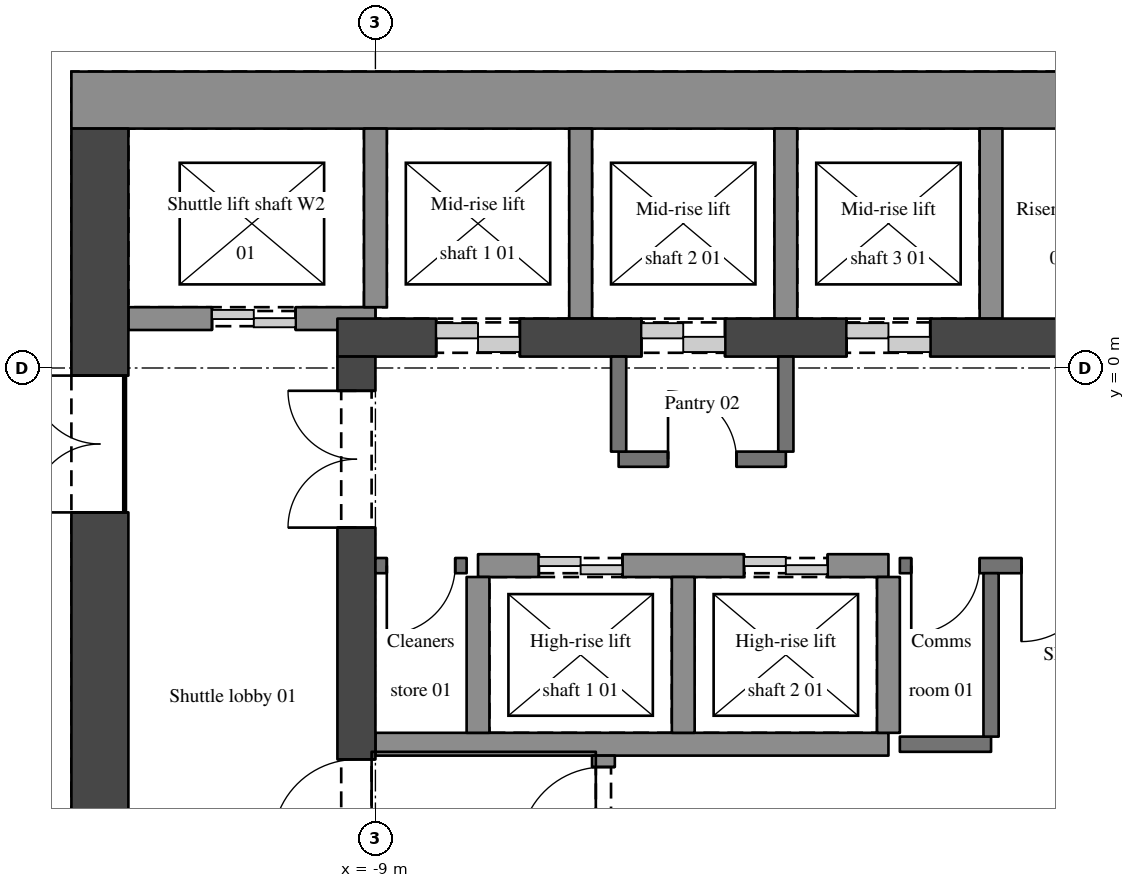
"""IFC4 building model, lengths in metres.
Left out: names, types, materials, properties, quantities, classifications, styles, units other than length and angle.
Written with IfcOpenShell. Run it as: python <this file> out.ifc"""

import sys

from ifc_helpers import new_model, si_unit, direction, frame, frame_2d, origin, place, context, subcontext, project, spatial, rectangle, extrude, element, fill, save


model = new_model("IFC4")
c1 = context("Model", 3, precision=1e-05, world=origin(), true_north=direction((0.0, 1.0)))
c2 = subcontext(c1, "Body", "Model", "MODEL_VIEW")
j1 = project(units=[si_unit("LENGTHUNIT", "METRE"), si_unit("PLANEANGLEUNIT", "RADIAN")], contexts=[c1])
p1 = place(None, origin())
s1 = spatial("IfcSite", under=j1, at=p1, CompositionType="ELEMENT")
p2 = place(p1, origin())
s2 = spatial("IfcBuilding", under=s1, at=p2, CompositionType="ELEMENT")
p3 = place(p2, frame((0.0, 0.0, 162.3)))
s3 = spatial("IfcBuildingStorey", under=s2, at=p3, CompositionType="ELEMENT", Elevation=162.3)
p4 = place(p3, frame((-13.0, 3.525, 0.0), z_axis=(0.0, 0.0, 1.0), x_axis=(1.0, 0.0, 0.0)))
e1 = element("IfcWall", 1, at=p4, inside=s3, PredefinedType="SHEAR", context=c2, shape_type="SweptSolid", body=[
    extrude(rectangle(XDim=26.0, YDim=0.75, at=frame_2d((13.0, 0.0))), origin(), (0.0, 0.0, 1.0), 5.4),
])
p5 = place(p3, frame((-12.625, -11.5, 0.0), z_axis=(0.0, 0.0, 1.0), x_axis=(0.0, 1.0, 0.0)))
e2 = element("IfcWall", 2, at=p5, inside=s3, PredefinedType="SHEAR", context=c2, shape_type="SweptSolid", body=[
    extrude(rectangle(XDim=14.65, YDim=0.75, at=frame_2d((7.325, 0.0))), origin(), (0.0, 0.0, 1.0), 5.4),
])
p6 = place(p5, frame((9.6, 0.0, 0.0)))
e3 = element("IfcOpeningElement", 3, at=p6, cuts=e2, PredefinedType="OPENING", context=c2, shape_type="SweptSolid", body=[
    extrude(rectangle(XDim=1.8, YDim=2.1, at=frame_2d((0.9, 1.05))), frame((0.0, 0.385, 0.0), z_axis=(0.0, -1.0, 0.0), x_axis=(1.0, 0.0, 0.0)), (0.0, 0.0, 1.0), 0.77),
])
p7 = place(p3, frame((-9.5, 0.4, 0.0), z_axis=(0.0, 0.0, 1.0), x_axis=(1.0, 0.0, 0.0)))
e4 = element("IfcWall", 4, at=p7, inside=s3, PredefinedType="SHEAR", context=c2, shape_type="SweptSolid", body=[
    extrude(rectangle(XDim=19.0, YDim=0.5, at=frame_2d((9.5, 0.0))), origin(), (0.0, 0.0, 1.0), 5.4),
])
p8 = place(p7, frame((1.3, 0.0, 0.0)))
e5 = element("IfcOpeningElement", 5, at=p8, cuts=e4, PredefinedType="OPENING", context=c2, shape_type="SweptSolid", body=[
    extrude(rectangle(XDim=1.1, YDim=2.1, at=frame_2d((0.55, 1.05))), frame((0.0, 0.26, 0.0), z_axis=(0.0, -1.0, 0.0), x_axis=(1.0, 0.0, 0.0)), (0.0, 0.0, 1.0), 0.52),
])
p9 = place(p7, frame((4.0, 0.0, 0.0)))
e6 = element("IfcOpeningElement", 6, at=p9, cuts=e4, PredefinedType="OPENING", context=c2, shape_type="SweptSolid", body=[
    extrude(rectangle(XDim=1.1, YDim=2.1, at=frame_2d((0.55, 1.05))), frame((0.0, 0.26, 0.0), z_axis=(0.0, -1.0, 0.0), x_axis=(1.0, 0.0, 0.0)), (0.0, 0.0, 1.0), 0.52),
])
p10 = place(p7, frame((6.7, 0.0, 0.0)))
e7 = element("IfcOpeningElement", 7, at=p10, cuts=e4, PredefinedType="OPENING", context=c2, shape_type="SweptSolid", body=[
    extrude(rectangle(XDim=1.1, YDim=2.1, at=frame_2d((0.55, 1.05))), frame((0.0, 0.26, 0.0), z_axis=(0.0, -1.0, 0.0), x_axis=(1.0, 0.0, 0.0)), (0.0, 0.0, 1.0), 0.52),
])
p11 = place(p7, frame((11.2, 0.0, 0.0)))
e8 = element("IfcOpeningElement", 8, at=p11, cuts=e4, PredefinedType="OPENING", context=c2, shape_type="SweptSolid", body=[
    extrude(rectangle(XDim=1.1, YDim=2.1, at=frame_2d((0.55, 1.05))), frame((0.0, 0.26, 0.0), z_axis=(0.0, -1.0, 0.0), x_axis=(1.0, 0.0, 0.0)), (0.0, 0.0, 1.0), 0.52),
])
p12 = place(p7, frame((13.9, 0.0, 0.0)))
e9 = element("IfcOpeningElement", 9, at=p12, cuts=e4, PredefinedType="OPENING", context=c2, shape_type="SweptSolid", body=[
    extrude(rectangle(XDim=1.1, YDim=2.1, at=frame_2d((0.55, 1.05))), frame((0.0, 0.26, 0.0), z_axis=(0.0, -1.0, 0.0), x_axis=(1.0, 0.0, 0.0)), (0.0, 0.0, 1.0), 0.52),
])
p13 = place(p7, frame((16.6, 0.0, 0.0)))
e10 = element("IfcOpeningElement", 10, at=p13, cuts=e4, PredefinedType="OPENING", context=c2, shape_type="SweptSolid", body=[
    extrude(rectangle(XDim=1.1, YDim=2.1, at=frame_2d((0.55, 1.05))), frame((0.0, 0.26, 0.0), z_axis=(0.0, -1.0, 0.0), x_axis=(1.0, 0.0, 0.0)), (0.0, 0.0, 1.0), 0.52),
])
p14 = place(p3, frame((-9.25, -11.5, 0.0), z_axis=(0.0, 0.0, 1.0), x_axis=(0.0, 1.0, 0.0)))
e11 = element("IfcWall", 11, at=p14, inside=s3, PredefinedType="SHEAR", context=c2, shape_type="SweptSolid", body=[
    extrude(rectangle(XDim=11.65, YDim=0.5, at=frame_2d((5.825, 0.0))), origin(), (0.0, 0.0, 1.0), 5.4),
])
p15 = place(p14, frame((9.4, 0.0, 0.0)))
e12 = element("IfcOpeningElement", 12, at=p15, cuts=e11, PredefinedType="OPENING", context=c2, shape_type="SweptSolid", body=[
    extrude(rectangle(XDim=1.8, YDim=2.1, at=frame_2d((0.9, 1.05))), frame((0.0, 0.26, 0.0), z_axis=(0.0, -1.0, 0.0), x_axis=(1.0, 0.0, 0.0)), (0.0, 0.0, 1.0), 0.52),
])
p16 = place(p14, frame((5.25, 0.0, 0.0)))
e13 = element("IfcOpeningElement", 13, at=p16, cuts=e11, PredefinedType="OPENING", context=c2, shape_type="SweptSolid", body=[
    extrude(rectangle(XDim=1.1, YDim=2.1, at=frame_2d((0.55, 1.05))), frame((0.0, 0.26, 0.0), z_axis=(0.0, -1.0, 0.0), x_axis=(1.0, 0.0, 0.0)), (0.0, 0.0, 1.0), 0.52),
])
p17 = place(p3, frame((-9.0, -4.95, 0.0), z_axis=(0.0, 0.0, 1.0), x_axis=(1.0, 0.0, 0.0)))
e14 = element("IfcWall", 14, at=p17, inside=s3, PredefinedType="SHEAR", context=c2, shape_type="SweptSolid", body=[
    extrude(rectangle(XDim=6.75, YDim=0.3, at=frame_2d((3.375, 0.0))), origin(), (0.0, 0.0, 1.0), 5.4),
])
p18 = place(p3, frame((-2.1, -4.95, 0.0), z_axis=(0.0, 0.0, 1.0), x_axis=(1.0, 0.0, 0.0)))
e15 = element("IfcWall", 15, at=p18, inside=s3, PredefinedType="SOLIDWALL", context=c2, shape_type="SweptSolid", body=[
    extrude(rectangle(XDim=1.2, YDim=0.2, at=frame_2d((0.6, 0.0))), origin(), (0.0, 0.0, 1.0), 5.1),
])
p19 = place(p3, frame((-7.8, -2.6, 0.0), z_axis=(0.0, 0.0, 1.0), x_axis=(-1.0, 0.0, 0.0)))
e16 = element("IfcWall", 16, at=p19, inside=s3, PredefinedType="SOLIDWALL", context=c2, shape_type="SweptSolid", body=[
    extrude(rectangle(XDim=1.2, YDim=0.2, at=frame_2d((0.6, 0.0))), origin(), (0.0, 0.0, 1.0), 5.1),
])
p20 = place(p19, frame((0.15, 0.0, 0.0)))
e17 = element("IfcOpeningElement", 17, at=p20, cuts=e16, PredefinedType="OPENING", context=c2, shape_type="SweptSolid", body=[
    extrude(rectangle(XDim=0.9, YDim=2.1, at=frame_2d((0.45, 1.05))), frame((0.0, 0.11, 0.0), z_axis=(0.0, -1.0, 0.0), x_axis=(1.0, 0.0, 0.0)), (0.0, 0.0, 1.0), 0.22),
])
p21 = place(p3, frame((-7.65, -2.6, 0.0), z_axis=(0.0, 0.0, 1.0), x_axis=(1.0, 0.0, 0.0)))
e18 = element("IfcWall", 18, at=p21, inside=s3, PredefinedType="SHEAR", context=c2, shape_type="SweptSolid", body=[
    extrude(rectangle(XDim=5.4, YDim=0.3, at=frame_2d((2.7, 0.0))), origin(), (0.0, 0.0, 1.0), 5.4),
])
p22 = place(p21, frame((0.8, 0.0, 0.0)))
e19 = element("IfcOpeningElement", 19, at=p22, cuts=e18, PredefinedType="OPENING", context=c2, shape_type="SweptSolid", body=[
    extrude(rectangle(XDim=1.1, YDim=2.1, at=frame_2d((0.55, 1.05))), frame((0.0, 0.16, 0.0), z_axis=(0.0, -1.0, 0.0), x_axis=(1.0, 0.0, 0.0)), (0.0, 0.0, 1.0), 0.32),
])
p23 = place(p21, frame((3.5, 0.0, 0.0)))
e20 = element("IfcOpeningElement", 20, at=p23, cuts=e18, PredefinedType="OPENING", context=c2, shape_type="SweptSolid", body=[
    extrude(rectangle(XDim=1.1, YDim=2.1, at=frame_2d((0.55, 1.05))), frame((0.0, 0.16, 0.0), z_axis=(0.0, -1.0, 0.0), x_axis=(1.0, 0.0, 0.0)), (0.0, 0.0, 1.0), 0.32),
])
p24 = place(p3, frame((2.1, -2.6, 0.0), z_axis=(0.0, 0.0, 1.0), x_axis=(-1.0, 0.0, 0.0)))
e21 = element("IfcWall", 21, at=p24, inside=s3, PredefinedType="SOLIDWALL", context=c2, shape_type="SweptSolid", body=[
    extrude(rectangle(XDim=4.2, YDim=0.2, at=frame_2d((2.1, 0.0))), origin(), (0.0, 0.0, 1.0), 5.1),
])
p25 = place(p24, frame((1.6, 0.0, 0.0)))
e22 = element("IfcOpeningElement", 22, at=p25, cuts=e21, PredefinedType="OPENING", context=c2, shape_type="SweptSolid", body=[
    extrude(rectangle(XDim=1.0, YDim=2.1, at=frame_2d((0.5, 1.05))), frame((0.0, 0.11, 0.0), z_axis=(0.0, -1.0, 0.0), x_axis=(1.0, 0.0, 0.0)), (0.0, 0.0, 1.0), 0.22),
])
p26 = place(p24, frame((3.15, 0.0, 0.0)))
e23 = element("IfcOpeningElement", 23, at=p26, cuts=e21, PredefinedType="OPENING", context=c2, shape_type="SweptSolid", body=[
    extrude(rectangle(XDim=0.9, YDim=2.1, at=frame_2d((0.45, 1.05))), frame((0.0, 0.11, 0.0), z_axis=(0.0, -1.0, 0.0), x_axis=(1.0, 0.0, 0.0)), (0.0, 0.0, 1.0), 0.22),
])
p27 = place(p24, frame((0.15, 0.0, 0.0)))
e24 = element("IfcOpeningElement", 24, at=p27, cuts=e21, PredefinedType="OPENING", context=c2, shape_type="SweptSolid", body=[
    extrude(rectangle(XDim=0.9, YDim=2.1, at=frame_2d((0.45, 1.05))), frame((0.0, 0.11, 0.0), z_axis=(0.0, -1.0, 0.0), x_axis=(1.0, 0.0, 0.0)), (0.0, 0.0, 1.0), 0.22),
])
p28 = place(p3, frame((-5.8, -1.2, 0.0), z_axis=(0.0, 0.0, 1.0), x_axis=(1.0, 0.0, 0.0)))
e25 = element("IfcWall", 25, at=p28, inside=s3, PredefinedType="SOLIDWALL", context=c2, shape_type="SweptSolid", body=[
    extrude(rectangle(XDim=2.2, YDim=0.2, at=frame_2d((1.1, 0.0))), origin(), (0.0, 0.0, 1.0), 5.1),
])
p29 = place(p28, frame((0.65, 0.0, 0.0)))
e26 = element("IfcOpeningElement", 26, at=p29, cuts=e25, PredefinedType="OPENING", context=c2, shape_type="SweptSolid", body=[
    extrude(rectangle(XDim=0.9, YDim=2.1, at=frame_2d((0.45, 1.05))), frame((0.0, 0.11, 0.0), z_axis=(0.0, -1.0, 0.0), x_axis=(1.0, 0.0, 0.0)), (0.0, 0.0, 1.0), 0.22),
])
p30 = place(p3, frame((-9.0, 0.65, 0.0), z_axis=(0.0, 0.0, 1.0), x_axis=(-1.0, 0.0, 0.0)))
e27 = element("IfcWall", 27, at=p30, inside=s3, PredefinedType="SHEAR", context=c2, shape_type="SweptSolid", body=[
    extrude(rectangle(XDim=3.25, YDim=0.3, at=frame_2d((1.625, 0.0))), origin(), (0.0, 0.0, 1.0), 5.4),
])
p31 = place(p30, frame((1.05, 0.0, 0.0)))
e28 = element("IfcOpeningElement", 28, at=p31, cuts=e27, PredefinedType="OPENING", context=c2, shape_type="SweptSolid", body=[
    extrude(rectangle(XDim=1.1, YDim=2.1, at=frame_2d((0.55, 1.05))), frame((0.0, 0.16, 0.0), z_axis=(0.0, -1.0, 0.0), x_axis=(1.0, 0.0, 0.0)), (0.0, 0.0, 1.0), 0.32),
])
p32 = place(p3, frame((-9.0, 0.8, 0.0), z_axis=(0.0, 0.0, 1.0), x_axis=(0.0, 1.0, 0.0)))
e29 = element("IfcWall", 29, at=p32, inside=s3, PredefinedType="SHEAR", context=c2, shape_type="SweptSolid", body=[
    extrude(rectangle(XDim=2.35, YDim=0.3, at=frame_2d((1.175, 0.0))), origin(), (0.0, 0.0, 1.0), 5.4),
])
p33 = place(p3, frame((-7.65, -4.8, 0.0), z_axis=(0.0, 0.0, 1.0), x_axis=(0.0, 1.0, 0.0)))
e30 = element("IfcWall", 30, at=p33, inside=s3, PredefinedType="SHEAR", context=c2, shape_type="SweptSolid", body=[
    extrude(rectangle(XDim=2.05, YDim=0.3, at=frame_2d((1.025, 0.0))), origin(), (0.0, 0.0, 1.0), 5.4),
])
p34 = place(p3, frame((-6.3, 0.65, 0.0), z_axis=(0.0, 0.0, 1.0), x_axis=(0.0, 1.0, 0.0)))
e31 = element("IfcWall", 31, at=p34, inside=s3, PredefinedType="SHEAR", context=c2, shape_type="SweptSolid", body=[
    extrude(rectangle(XDim=2.5, YDim=0.3, at=frame_2d((1.25, 0.0))), origin(), (0.0, 0.0, 1.0), 5.4),
])
p35 = place(p3, frame((-6.0, -11.5, 0.0), z_axis=(0.0, 0.0, 1.0), x_axis=(0.0, 1.0, 0.0)))
e32 = element("IfcWall", 32, at=p35, inside=s3, PredefinedType="SHEAR", context=c2, shape_type="SweptSolid", body=[
    extrude(rectangle(XDim=6.4, YDim=0.3, at=frame_2d((3.2, 0.0))), origin(), (0.0, 0.0, 1.0), 5.4),
])
p36 = place(p35, frame((5.15, 0.0, 0.0)))
e33 = element("IfcOpeningElement", 33, at=p36, cuts=e32, PredefinedType="OPENING", context=c2, shape_type="SweptSolid", body=[
    extrude(rectangle(XDim=1.1, YDim=2.1, at=frame_2d((0.55, 1.05))), frame((0.0, 0.16, 0.0), z_axis=(0.0, -1.0, 0.0), x_axis=(1.0, 0.0, 0.0)), (0.0, 0.0, 1.0), 0.32),
])
p37 = place(p3, frame((-5.8, -1.1, 0.0), z_axis=(0.0, 0.0, 1.0), x_axis=(0.0, 1.0, 0.0)))
e34 = element("IfcWall", 34, at=p37, inside=s3, PredefinedType="SOLIDWALL", context=c2, shape_type="SweptSolid", body=[
    extrude(rectangle(XDim=1.25, YDim=0.2, at=frame_2d((0.625, 0.0))), origin(), (0.0, 0.0, 1.0), 5.1),
])
p38 = place(p3, frame((-4.95, -4.8, 0.0), z_axis=(0.0, 0.0, 1.0), x_axis=(0.0, 1.0, 0.0)))
e35 = element("IfcWall", 35, at=p38, inside=s3, PredefinedType="SHEAR", context=c2, shape_type="SweptSolid", body=[
    extrude(rectangle(XDim=2.05, YDim=0.3, at=frame_2d((1.025, 0.0))), origin(), (0.0, 0.0, 1.0), 5.4),
])
p39 = place(p3, frame((-3.6, -1.1, 0.0), z_axis=(0.0, 0.0, 1.0), x_axis=(0.0, 1.0, 0.0)))
e36 = element("IfcWall", 36, at=p39, inside=s3, PredefinedType="SOLIDWALL", context=c2, shape_type="SweptSolid", body=[
    extrude(rectangle(XDim=1.25, YDim=0.2, at=frame_2d((0.625, 0.0))), origin(), (0.0, 0.0, 1.0), 5.1),
])
p40 = place(p3, frame((-3.6, 0.65, 0.0), z_axis=(0.0, 0.0, 1.0), x_axis=(0.0, 1.0, 0.0)))
e37 = element("IfcWall", 37, at=p40, inside=s3, PredefinedType="SHEAR", context=c2, shape_type="SweptSolid", body=[
    extrude(rectangle(XDim=2.5, YDim=0.3, at=frame_2d((1.25, 0.0))), origin(), (0.0, 0.0, 1.0), 5.4),
])
p41 = place(p3, frame((-2.25, -4.8, 0.0), z_axis=(0.0, 0.0, 1.0), x_axis=(0.0, 1.0, 0.0)))
e38 = element("IfcWall", 38, at=p41, inside=s3, PredefinedType="SHEAR", context=c2, shape_type="SweptSolid", body=[
    extrude(rectangle(XDim=2.05, YDim=0.3, at=frame_2d((1.025, 0.0))), origin(), (0.0, 0.0, 1.0), 5.4),
])
p42 = place(p3, frame((-0.9, -4.85, 0.0), z_axis=(0.0, 0.0, 1.0), x_axis=(0.0, 1.0, 0.0)))
e39 = element("IfcWall", 39, at=p42, inside=s3, PredefinedType="SOLIDWALL", context=c2, shape_type="SweptSolid", body=[
    extrude(rectangle(XDim=2.15, YDim=0.2, at=frame_2d((1.075, 0.0))), origin(), (0.0, 0.0, 1.0), 5.1),
])
p43 = place(p3, frame((-0.9, 0.65, 0.0), z_axis=(0.0, 0.0, 1.0), x_axis=(0.0, 1.0, 0.0)))
e40 = element("IfcWall", 40, at=p43, inside=s3, PredefinedType="SHEAR", context=c2, shape_type="SweptSolid", body=[
    extrude(rectangle(XDim=2.5, YDim=0.3, at=frame_2d((1.25, 0.0))), origin(), (0.0, 0.0, 1.0), 5.4),
])
p44 = place(p6, origin())
e41 = element("IfcDoor", 41, at=p44, inside=s3, OperationType="DOUBLE_DOOR_SINGLE_SWING", PredefinedType="DOOR", context=c2, shape_type="SweptSolid", body=[
    extrude(rectangle(XDim=1.8, YDim=2.1, at=frame_2d((0.9, 1.05))), frame((0.0, 0.025, 0.0), z_axis=(0.0, -1.0, 0.0), x_axis=(1.0, 0.0, 0.0)), (0.0, 0.0, 1.0), 0.05),
])
fill(e3, e41)
p45 = place(p15, origin())
e42 = element("IfcDoor", 42, at=p45, inside=s3, OperationType="DOUBLE_DOOR_SINGLE_SWING", PredefinedType="DOOR", context=c2, shape_type="SweptSolid", body=[
    extrude(rectangle(XDim=1.8, YDim=2.1, at=frame_2d((0.9, 1.05))), frame((0.0, 0.025, 0.0), z_axis=(0.0, -1.0, 0.0), x_axis=(1.0, 0.0, 0.0)), (0.0, 0.0, 1.0), 0.05),
])
fill(e12, e42)
p46 = place(p25, origin())
e43 = element("IfcDoor", 43, at=p46, inside=s3, OperationType="SINGLE_SWING_RIGHT", PredefinedType="DOOR", context=c2, shape_type="SweptSolid", body=[
    extrude(rectangle(XDim=1.0, YDim=2.1, at=frame_2d((0.5, 1.05))), frame((0.0, 0.025, 0.0), z_axis=(0.0, -1.0, 0.0), x_axis=(1.0, 0.0, 0.0)), (0.0, 0.0, 1.0), 0.05),
])
fill(e22, e43)
p47 = place(p36, origin())
e44 = element("IfcDoor", 44, at=p47, inside=s3, OperationType="SINGLE_SWING_LEFT", PredefinedType="DOOR", context=c2, shape_type="SweptSolid", body=[
    extrude(rectangle(XDim=1.1, YDim=2.1, at=frame_2d((0.55, 1.05))), frame((0.0, 0.025, 0.0), z_axis=(0.0, -1.0, 0.0), x_axis=(1.0, 0.0, 0.0)), (0.0, 0.0, 1.0), 0.05),
])
fill(e33, e44)
p48 = place(p16, origin())
e45 = element("IfcDoor", 45, at=p48, inside=s3, OperationType="SINGLE_SWING_LEFT", PredefinedType="DOOR", context=c2, shape_type="SweptSolid", body=[
    extrude(rectangle(XDim=1.1, YDim=2.1, at=frame_2d((0.55, 1.05))), frame((0.0, 0.025, 0.0), z_axis=(0.0, -1.0, 0.0), x_axis=(1.0, 0.0, 0.0)), (0.0, 0.0, 1.0), 0.05),
])
fill(e13, e45)
p49 = place(p26, origin())
e46 = element("IfcDoor", 46, at=p49, inside=s3, OperationType="SINGLE_SWING_RIGHT", PredefinedType="DOOR", context=c2, shape_type="SweptSolid", body=[
    extrude(rectangle(XDim=0.9, YDim=2.1, at=frame_2d((0.45, 1.05))), frame((0.0, 0.025, 0.0), z_axis=(0.0, -1.0, 0.0), x_axis=(1.0, 0.0, 0.0)), (0.0, 0.0, 1.0), 0.05),
])
fill(e23, e46)
p50 = place(p20, origin())
e47 = element("IfcDoor", 47, at=p50, inside=s3, OperationType="SINGLE_SWING_RIGHT", PredefinedType="DOOR", context=c2, shape_type="SweptSolid", body=[
    extrude(rectangle(XDim=0.9, YDim=2.1, at=frame_2d((0.45, 1.05))), frame((0.0, 0.025, 0.0), z_axis=(0.0, -1.0, 0.0), x_axis=(1.0, 0.0, 0.0)), (0.0, 0.0, 1.0), 0.05),
])
fill(e17, e47)
p51 = place(p29, origin())
e48 = element("IfcDoor", 48, at=p51, inside=s3, OperationType="SINGLE_SWING_LEFT", PredefinedType="DOOR", context=c2, shape_type="SweptSolid", body=[
    extrude(rectangle(XDim=0.9, YDim=2.1, at=frame_2d((0.45, 1.05))), frame((0.0, 0.025, 0.0), z_axis=(0.0, -1.0, 0.0), x_axis=(1.0, 0.0, 0.0)), (0.0, 0.0, 1.0), 0.05),
])
fill(e26, e48)
p52 = place(p22, origin())
e49 = element("IfcDoor", 49, at=p52, inside=s3, OperationType="DOUBLE_DOOR_SLIDING", PredefinedType="DOOR", context=c2, shape_type="SweptSolid", body=[
    extrude(rectangle(XDim=1.1, YDim=2.1, at=frame_2d((0.55, 1.05))), frame((0.0, 0.025, 0.0), z_axis=(0.0, -1.0, 0.0), x_axis=(1.0, 0.0, 0.0)), (0.0, 0.0, 1.0), 0.05),
])
fill(e19, e49)
p53 = place(p23, origin())
e50 = element("IfcDoor", 50, at=p53, inside=s3, OperationType="DOUBLE_DOOR_SLIDING", PredefinedType="DOOR", context=c2, shape_type="SweptSolid", body=[
    extrude(rectangle(XDim=1.1, YDim=2.1, at=frame_2d((0.55, 1.05))), frame((0.0, 0.025, 0.0), z_axis=(0.0, -1.0, 0.0), x_axis=(1.0, 0.0, 0.0)), (0.0, 0.0, 1.0), 0.05),
])
fill(e20, e50)
p54 = place(p8, origin())
e51 = element("IfcDoor", 51, at=p54, inside=s3, OperationType="DOUBLE_DOOR_SLIDING", PredefinedType="DOOR", context=c2, shape_type="SweptSolid", body=[
    extrude(rectangle(XDim=1.1, YDim=2.1, at=frame_2d((0.55, 1.05))), frame((0.0, 0.025, 0.0), z_axis=(0.0, -1.0, 0.0), x_axis=(1.0, 0.0, 0.0)), (0.0, 0.0, 1.0), 0.05),
])
fill(e5, e51)
p55 = place(p9, origin())
e52 = element("IfcDoor", 52, at=p55, inside=s3, OperationType="DOUBLE_DOOR_SLIDING", PredefinedType="DOOR", context=c2, shape_type="SweptSolid", body=[
    extrude(rectangle(XDim=1.1, YDim=2.1, at=frame_2d((0.55, 1.05))), frame((0.0, 0.025, 0.0), z_axis=(0.0, -1.0, 0.0), x_axis=(1.0, 0.0, 0.0)), (0.0, 0.0, 1.0), 0.05),
])
fill(e6, e52)
p56 = place(p10, origin())
e53 = element("IfcDoor", 53, at=p56, inside=s3, OperationType="DOUBLE_DOOR_SLIDING", PredefinedType="DOOR", context=c2, shape_type="SweptSolid", body=[
    extrude(rectangle(XDim=1.1, YDim=2.1, at=frame_2d((0.55, 1.05))), frame((0.0, 0.025, 0.0), z_axis=(0.0, -1.0, 0.0), x_axis=(1.0, 0.0, 0.0)), (0.0, 0.0, 1.0), 0.05),
])
fill(e7, e53)
p57 = place(p31, origin())
e54 = element("IfcDoor", 54, at=p57, inside=s3, OperationType="DOUBLE_DOOR_SLIDING", PredefinedType="DOOR", context=c2, shape_type="SweptSolid", body=[
    extrude(rectangle(XDim=1.1, YDim=2.1, at=frame_2d((0.55, 1.05))), frame((0.0, 0.025, 0.0), z_axis=(0.0, -1.0, 0.0), x_axis=(1.0, 0.0, 0.0)), (0.0, 0.0, 1.0), 0.05),
])
fill(e28, e54)
save(model, sys.argv[1])
